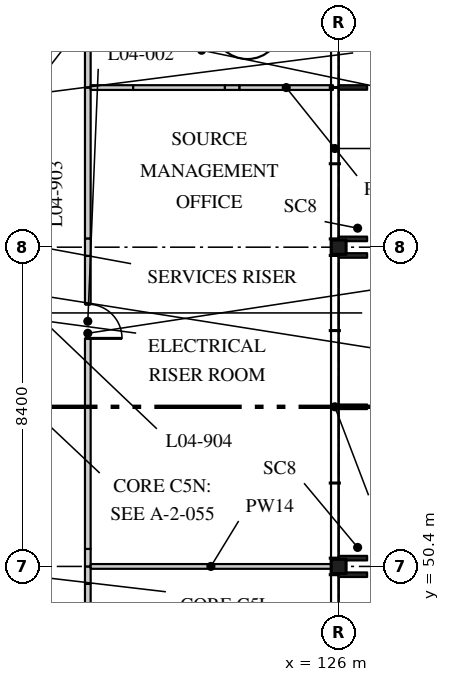
"""IFC4 building model, lengths in metres.
Left out: names, types, materials, properties, quantities, classifications, styles, units other than length and angle.
Written with IfcOpenShell. Run it as: python <this file> out.ifc"""

import sys

from ifc_helpers import new_model, si_unit, direction, frame, frame_2d, origin, origin_2d, place, context, subcontext, project, spatial, rectangle, i_section, extrude, element, fill, save


model = new_model("IFC4")
c1 = context("Model", 3, precision=1e-05, world=origin(), true_north=direction((0.0, 1.0)))
c2 = subcontext(c1, "Body", "Model", "MODEL_VIEW")
j1 = project(units=[si_unit("LENGTHUNIT", "METRE"), si_unit("PLANEANGLEUNIT", "RADIAN")], contexts=[c1])
p1 = place(None, origin())
s1 = spatial("IfcSite", under=j1, at=p1, CompositionType="ELEMENT")
p2 = place(p1, origin())
s2 = spatial("IfcBuilding", under=s1, at=p2, CompositionType="ELEMENT")
p3 = place(p2, frame((0.0, 0.0, 18.9)))
s3 = spatial("IfcBuildingStorey", under=s2, at=p3, CompositionType="ELEMENT", Elevation=18.9)
for number, where, z_axis, x_axis in (
    (1, (126.0, 50.4, 0.0), (0.0, 0.0, 1.0), (1.0, 0.0, 0.0)),
    (2, (126.0, 58.8, 0.0), (0.0, 0.0, 1.0), (1.0, 0.0, 0.0)),
):
    element("IfcColumn", number, at=place(p3, frame(where, z_axis=z_axis, x_axis=x_axis)), inside=s3, PredefinedType="COLUMN", context=c2, shape_type="SweptSolid", body=[
        extrude(i_section(OverallWidth=0.394, OverallDepth=0.376, WebThickness=0.017, FlangeThickness=0.028, FilletRadius=0.015, at=origin_2d()), origin(), (0.0, 0.0, 1.0), 4.37),
    ])
p4 = place(p3, frame((119.4, 42.23, 0.0), z_axis=(0.0, 0.0, 1.0), x_axis=(0.0, 1.0, 0.0)))
e3 = element("IfcWall", 3, at=p4, inside=s3, PredefinedType="PARTITIONING", context=c2, shape_type="SweptSolid", body=[
    extrude(rectangle(XDim=7.71, YDim=0.15, at=frame_2d((3.855, 0.0))), origin(), (0.0, 0.0, 1.0), 4.37),
])
p5 = place(p3, frame((119.4, 49.94, 0.0), z_axis=(0.0, 0.0, 1.0), x_axis=(0.0, 1.0, 0.0)))
e4 = element("IfcWall", 4, at=p5, inside=s3, PredefinedType="PARTITIONING", context=c2, shape_type="SweptSolid", body=[
    extrude(rectangle(XDim=0.46, YDim=0.15, at=frame_2d((0.23, 0.0))), origin(), (0.0, 0.0, 1.0), 3.746),
])
p6 = place(p3, frame((119.4, 50.4, 0.0), z_axis=(0.0, 0.0, 1.0), x_axis=(0.0, 1.0, 0.0)))
e5 = element("IfcWall", 5, at=p6, inside=s3, PredefinedType="PARTITIONING", context=c2, shape_type="SweptSolid", body=[
    extrude(rectangle(XDim=0.46, YDim=0.15, at=frame_2d((0.23, 0.0))), origin(), (0.0, 0.0, 1.0), 3.746),
])
p7 = place(p3, frame((119.4, 50.86, 0.0), z_axis=(0.0, 0.0, 1.0), x_axis=(0.0, 1.0, 0.0)))
e6 = element("IfcWall", 6, at=p7, inside=s3, PredefinedType="PARTITIONING", context=c2, shape_type="SweptSolid", body=[
    extrude(rectangle(XDim=7.71, YDim=0.15, at=frame_2d((3.855, 0.0))), origin(), (0.0, 0.0, 1.0), 4.37),
])
p8 = place(p7, frame((5.54, 0.0, 0.0)))
e7 = element("IfcOpeningElement", 7, at=p8, cuts=e6, PredefinedType="OPENING", context=c2, shape_type="SweptSolid", body=[
    extrude(rectangle(XDim=0.9, YDim=2.1, at=frame_2d((0.45, 1.05))), frame((0.0, 0.085, 0.0), z_axis=(0.0, -1.0, 0.0), x_axis=(1.0, 0.0, 0.0)), (0.0, 0.0, 1.0), 0.17),
])
p9 = place(p3, frame((119.4, 58.57, 0.0), z_axis=(0.0, 0.0, 1.0), x_axis=(0.0, 1.0, 0.0)))
e8 = element("IfcWall", 8, at=p9, inside=s3, PredefinedType="PARTITIONING", context=c2, shape_type="SweptSolid", body=[
    extrude(rectangle(XDim=0.46, YDim=0.15, at=frame_2d((0.23, 0.0))), origin(), (0.0, 0.0, 1.0), 3.746),
])
p10 = place(p3, frame((119.4, 59.03, 0.0), z_axis=(0.0, 0.0, 1.0), x_axis=(0.0, 1.0, 0.0)))
e9 = element("IfcWall", 9, at=p10, inside=s3, PredefinedType="PARTITIONING", context=c2, shape_type="SweptSolid", body=[
    extrude(rectangle(XDim=3.97, YDim=0.15, at=frame_2d((1.985, 0.0))), origin(), (0.0, 0.0, 1.0), 4.37),
])
p11 = place(p3, frame((119.4, 63.0, 0.0), z_axis=(0.0, 0.0, 1.0), x_axis=(0.0, 1.0, 0.0)))
e10 = element("IfcWall", 10, at=p11, inside=s3, PredefinedType="PARTITIONING", context=c2, shape_type="SweptSolid", body=[
    extrude(rectangle(XDim=4.05, YDim=0.15, at=frame_2d((2.025, 0.0))), origin(), (0.0, 0.0, 1.0), 4.37),
])
p12 = place(p11, frame((1.35, 0.0, 0.0)))
e11 = element("IfcOpeningElement", 11, at=p12, cuts=e10, PredefinedType="OPENING", context=c2, shape_type="SweptSolid", body=[
    extrude(rectangle(XDim=0.9, YDim=2.1, at=frame_2d((0.45, 1.05))), frame((0.0, 0.085, 0.0), z_axis=(0.0, -1.0, 0.0), x_axis=(1.0, 0.0, 0.0)), (0.0, 0.0, 1.0), 0.17),
])
p13 = place(p3, frame((119.475, 50.4, 0.0), z_axis=(0.0, 0.0, 1.0), x_axis=(1.0, 0.0, 0.0)))
e12 = element("IfcWall", 12, at=p13, inside=s3, PredefinedType="PARTITIONING", context=c2, shape_type="SweptSolid", body=[
    extrude(rectangle(XDim=6.328, YDim=0.125, at=frame_2d((3.164, 0.0))), origin(), (0.0, 0.0, 1.0), 3.746),
])
p14 = place(p3, frame((119.475, 63.0, 0.0), z_axis=(0.0, 0.0, 1.0), x_axis=(1.0, 0.0, 0.0)))
e13 = element("IfcWall", 13, at=p14, inside=s3, PredefinedType="PARTITIONING", context=c2, shape_type="SweptSolid", body=[
    extrude(rectangle(XDim=1.118, YDim=0.125, at=frame_2d((0.559, 0.0))), origin(), (0.0, 0.0, 1.0), 3.895),
])
p15 = place(p3, frame((120.593, 63.0, 0.0), z_axis=(0.0, 0.0, 1.0), x_axis=(1.0, 0.0, 0.0)))
e14 = element("IfcWall", 14, at=p15, inside=s3, PredefinedType="PARTITIONING", context=c2, shape_type="SweptSolid", body=[
    extrude(rectangle(XDim=2.415, YDim=0.125, at=frame_2d((1.208, 0.0))), origin(), (0.0, 0.0, 1.0), 4.37),
])
p16 = place(p3, frame((123.008, 63.0, 0.0), z_axis=(0.0, 0.0, 1.0), x_axis=(1.0, 0.0, 0.0)))
e15 = element("IfcWall", 15, at=p16, inside=s3, PredefinedType="PARTITIONING", context=c2, shape_type="SweptSolid", body=[
    extrude(rectangle(XDim=0.384, YDim=0.125, at=frame_2d((0.192, 0.0))), origin(), (0.0, 0.0, 1.0), 3.895),
])
p17 = place(p3, frame((123.392, 63.0, 0.0), z_axis=(0.0, 0.0, 1.0), x_axis=(1.0, 0.0, 0.0)))
e16 = element("IfcWall", 16, at=p17, inside=s3, PredefinedType="PARTITIONING", context=c2, shape_type="SweptSolid", body=[
    extrude(rectangle(XDim=2.458, YDim=0.125, at=frame_2d((1.229, 0.0))), origin(), (0.0, 0.0, 1.0), 4.37),
])
p18 = place(p8, frame((0.9, 0.0, 0.0), z_axis=(0.0, 0.0, 1.0), x_axis=(-1.0, 0.0, 0.0)))
e17 = element("IfcDoor", 17, at=p18, inside=s3, OperationType="SINGLE_SWING_LEFT", PredefinedType="DOOR", context=c2, shape_type="SweptSolid", body=[
    extrude(rectangle(XDim=0.9, YDim=2.1, at=frame_2d((0.45, 1.05))), frame((0.0, 0.025, 0.0), z_axis=(0.0, -1.0, 0.0), x_axis=(1.0, 0.0, 0.0)), (0.0, 0.0, 1.0), 0.05),
])
fill(e7, e17)
save(model, sys.argv[1])
